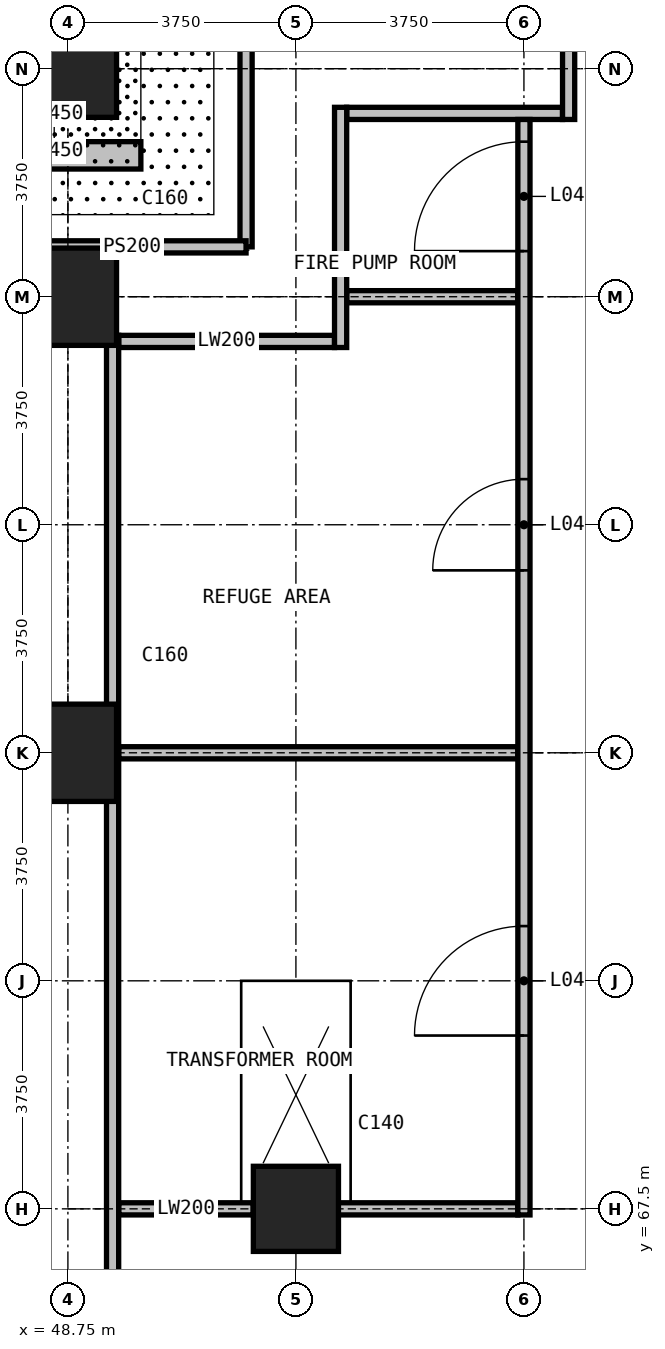
"""IFC4 building model, lengths in metres.
Left out: names, types, materials, properties, quantities, classifications, styles, units other than length and angle.
Written with IfcOpenShell. Run it as: python <this file> out.ifc"""

import sys

from ifc_helpers import new_model, si_unit, direction, frame, frame_2d, origin, origin_2d, place, context, subcontext, project, spatial, rectangle, extrude, element, fill, save


model = new_model("IFC4")
c1 = context("Model", 3, precision=1e-05, world=origin(), true_north=direction((0.0, 1.0)))
c2 = subcontext(c1, "Body", "Model", "MODEL_VIEW")
j1 = project(units=[si_unit("LENGTHUNIT", "METRE"), si_unit("PLANEANGLEUNIT", "RADIAN")], contexts=[c1])
p1 = place(None, origin())
s1 = spatial("IfcSite", under=j1, at=p1, CompositionType="ELEMENT")
p2 = place(p1, origin())
s2 = spatial("IfcBuilding", under=s1, at=p2, CompositionType="ELEMENT")
p3 = place(p2, frame((0.0, 0.0, 30.0)))
s3 = spatial("IfcBuildingStorey", under=s2, at=p3, CompositionType="ELEMENT", Elevation=30.0)
for number, where, z_axis, x_axis in (
    (1, (48.75, 75.0, 0.0), (0.0, 0.0, 1.0), (1.0, 0.0, 0.0)),
    (2, (48.75, 82.5, 0.0), (0.0, 0.0, 1.0), (1.0, 0.0, 0.0)),
):
    element("IfcColumn", number, at=place(p3, frame(where, z_axis=z_axis, x_axis=x_axis)), inside=s3, PredefinedType="COLUMN", context=c2, shape_type="SweptSolid", body=[
        extrude(rectangle(XDim=1.6, YDim=1.6, at=origin_2d()), origin(), (0.0, 0.0, 1.0), 5.0),
    ])
p4 = place(p3, frame((52.5, 67.5, 0.0), z_axis=(0.0, 0.0, 1.0), x_axis=(1.0, 0.0, 0.0)))
e3 = element("IfcColumn", 3, at=p4, inside=s3, PredefinedType="COLUMN", context=c2, shape_type="SweptSolid", body=[
    extrude(rectangle(XDim=1.4, YDim=1.4, at=origin_2d()), origin(), (0.0, 0.0, 1.0), 5.0),
])
p5 = place(p3, frame((48.75, 86.25, 0.0), z_axis=(0.0, 0.0, 1.0), x_axis=(1.0, 0.0, 0.0)))
e4 = element("IfcColumn", 4, at=p5, inside=s3, PredefinedType="COLUMN", context=c2, shape_type="SweptSolid", body=[
    extrude(rectangle(XDim=1.6, YDim=1.6, at=origin_2d()), origin(), (0.0, 0.0, 1.0), 5.0),
])
for number, where, z_axis, x_axis in (
    (5, (51.68, 83.32, 0.0), (0.0, 0.0, 1.0), (0.0, 1.0, 0.0)),
    (6, (47.93, 83.32, 0.0), (0.0, 0.0, 1.0), (1.0, 0.0, 0.0)),
):
    element("IfcWall", number, at=place(p3, frame(where, z_axis=z_axis, x_axis=x_axis)), inside=s3, PredefinedType="SOLIDWALL", context=c2, shape_type="SweptSolid", body=[
        extrude(rectangle(XDim=3.75, YDim=0.2, at=frame_2d((1.875, 0.0))), origin(), (0.0, 0.0, 1.0), 4.7),
    ])
p6 = place(p3, frame((47.1, 84.825, 0.0), z_axis=(0.0, 0.0, 1.0), x_axis=(1.0, 0.0, 0.0)))
e7 = element("IfcWall", 7, at=p6, inside=s3, PredefinedType="USERDEFINED", context=c2, shape_type="SweptSolid", body=[
    extrude(rectangle(XDim=2.85, YDim=0.45, at=frame_2d((1.425, 0.0))), origin(), (0.0, 0.0, 1.0), 5.2),
])
p7 = place(p3, frame((49.585, 67.5, 0.0), z_axis=(0.0, 0.0, 1.0), x_axis=(1.0, 0.0, 0.0)))
e8 = element("IfcWall", 8, at=p7, inside=s3, PredefinedType="PARTITIONING", context=c2, shape_type="SweptSolid", body=[
    extrude(rectangle(XDim=2.215, YDim=0.2, at=frame_2d((1.107, 0.0))), origin(), (0.0, 0.0, 1.0), 3.3),
])
p8 = place(p3, frame((51.8, 67.5, 0.0), z_axis=(0.0, 0.0, 1.0), x_axis=(1.0, 0.0, 0.0)))
e9 = element("IfcWall", 9, at=p8, inside=s3, PredefinedType="PARTITIONING", context=c2, shape_type="SweptSolid", body=[
    extrude(rectangle(XDim=1.349, YDim=0.2, at=frame_2d((0.674, 0.0))), origin(), (0.0, 0.0, 1.0), 4.7),
])
p9 = place(p3, frame((53.149, 67.5, 0.0), z_axis=(0.0, 0.0, 1.0), x_axis=(1.0, 0.0, 0.0)))
e10 = element("IfcWall", 10, at=p9, inside=s3, PredefinedType="PARTITIONING", context=c2, shape_type="SweptSolid", body=[
    extrude(rectangle(XDim=3.001, YDim=0.2, at=frame_2d((1.5, 0.0))), origin(), (0.0, 0.0, 1.0), 3.1),
])
p10 = place(p3, frame((49.585, 75.0, 0.0), z_axis=(0.0, 0.0, 1.0), x_axis=(1.0, 0.0, 0.0)))
e11 = element("IfcWall", 11, at=p10, inside=s3, PredefinedType="PARTITIONING", context=c2, shape_type="SweptSolid", body=[
    extrude(rectangle(XDim=6.565, YDim=0.2, at=frame_2d((3.282, 0.0))), origin(), (0.0, 0.0, 1.0), 2.1),
])
p11 = place(p3, frame((49.585, 81.765, 0.0), z_axis=(0.0, 0.0, 1.0), x_axis=(1.0, 0.0, 0.0)))
e12 = element("IfcWall", 12, at=p11, inside=s3, PredefinedType="PARTITIONING", context=c2, shape_type="SweptSolid", body=[
    extrude(rectangle(XDim=3.55, YDim=0.2, at=frame_2d((1.775, 0.0))), origin(), (0.0, 0.0, 1.0), 4.7),
])
p12 = place(p3, frame((53.335, 82.5, 0.0), z_axis=(0.0, 0.0, 1.0), x_axis=(1.0, 0.0, 0.0)))
e13 = element("IfcWall", 13, at=p12, inside=s3, PredefinedType="PARTITIONING", context=c2, shape_type="SweptSolid", body=[
    extrude(rectangle(XDim=2.815, YDim=0.2, at=frame_2d((1.407, 0.0))), origin(), (0.0, 0.0, 1.0), 2.1),
])
p13 = place(p3, frame((53.335, 85.515, 0.0), z_axis=(0.0, 0.0, 1.0), x_axis=(1.0, 0.0, 0.0)))
e14 = element("IfcWall", 14, at=p13, inside=s3, PredefinedType="PARTITIONING", context=c2, shape_type="SweptSolid", body=[
    extrude(rectangle(XDim=3.55, YDim=0.2, at=frame_2d((1.775, 0.0))), origin(), (0.0, 0.0, 1.0), 4.7),
])
p14 = place(p3, frame((49.485, 53.135, 0.0), z_axis=(0.0, 0.0, 1.0), x_axis=(0.0, 1.0, 0.0)))
e15 = element("IfcWall", 15, at=p14, inside=s3, PredefinedType="PARTITIONING", context=c2, shape_type="SweptSolid", body=[
    extrude(rectangle(XDim=28.73, YDim=0.2, at=frame_2d((14.365, 0.0))), origin(), (0.0, 0.0, 1.0), 4.7),
])
p15 = place(p3, frame((53.235, 81.665, 0.0), z_axis=(0.0, 0.0, 1.0), x_axis=(0.0, 1.0, 0.0)))
e16 = element("IfcWall", 16, at=p15, inside=s3, PredefinedType="PARTITIONING", context=c2, shape_type="SweptSolid", body=[
    extrude(rectangle(XDim=3.95, YDim=0.2, at=frame_2d((1.975, 0.0))), origin(), (0.0, 0.0, 1.0), 4.7),
])
p16 = place(p3, frame((56.25, 67.4, 0.0), z_axis=(0.0, 0.0, 1.0), x_axis=(0.0, 1.0, 0.0)))
e17 = element("IfcWall", 17, at=p16, inside=s3, PredefinedType="PARTITIONING", context=c2, shape_type="SweptSolid", body=[
    extrude(rectangle(XDim=18.015, YDim=0.2, at=frame_2d((9.008, 0.0))), origin(), (0.0, 0.0, 1.0), 4.7),
])
p17 = place(p16, frame((10.6, 0.0, 0.0)))
e18 = element("IfcOpeningElement", 18, at=p17, cuts=e17, PredefinedType="OPENING", context=c2, shape_type="SweptSolid", body=[
    extrude(rectangle(XDim=1.5, YDim=2.2, at=frame_2d((0.75, 1.1))), frame((0.0, 0.11, 0.0), z_axis=(0.0, -1.0, 0.0), x_axis=(1.0, 0.0, 0.0)), (0.0, 0.0, 1.0), 0.22),
])
p18 = place(p16, frame((2.95, 0.0, 0.0)))
e19 = element("IfcOpeningElement", 19, at=p18, cuts=e17, PredefinedType="OPENING", context=c2, shape_type="SweptSolid", body=[
    extrude(rectangle(XDim=1.8, YDim=2.3, at=frame_2d((0.9, 1.15))), frame((0.0, 0.11, 0.0), z_axis=(0.0, -1.0, 0.0), x_axis=(1.0, 0.0, 0.0)), (0.0, 0.0, 1.0), 0.22),
])
p19 = place(p16, frame((15.85, 0.0, 0.0)))
e20 = element("IfcOpeningElement", 20, at=p19, cuts=e17, PredefinedType="OPENING", context=c2, shape_type="SweptSolid", body=[
    extrude(rectangle(XDim=1.8, YDim=2.3, at=frame_2d((0.9, 1.15))), frame((0.0, 0.11, 0.0), z_axis=(0.0, -1.0, 0.0), x_axis=(1.0, 0.0, 0.0)), (0.0, 0.0, 1.0), 0.22),
])
p20 = place(p3, frame((56.985, 85.415, 0.0), z_axis=(0.0, 0.0, 1.0), x_axis=(0.0, 1.0, 0.0)))
e21 = element("IfcWall", 21, at=p20, inside=s3, PredefinedType="PARTITIONING", context=c2, shape_type="SweptSolid", body=[
    extrude(rectangle(XDim=3.95, YDim=0.2, at=frame_2d((1.975, 0.0))), origin(), (0.0, 0.0, 1.0), 4.7),
])
p21 = place(p17, origin())
e22 = element("IfcDoor", 22, at=p21, inside=s3, OperationType="DOUBLE_DOOR_SINGLE_SWING", PredefinedType="DOOR", context=c2, shape_type="SweptSolid", body=[
    extrude(rectangle(XDim=1.5, YDim=2.2, at=frame_2d((0.75, 1.1))), frame((0.0, 0.025, 0.0), z_axis=(0.0, -1.0, 0.0), x_axis=(1.0, 0.0, 0.0)), (0.0, 0.0, 1.0), 0.05),
])
fill(e18, e22)
p22 = place(p18, origin())
e23 = element("IfcDoor", 23, at=p22, inside=s3, OperationType="DOUBLE_DOOR_SINGLE_SWING", PredefinedType="DOOR", context=c2, shape_type="SweptSolid", body=[
    extrude(rectangle(XDim=1.8, YDim=2.3, at=frame_2d((0.9, 1.15))), frame((0.0, 0.025, 0.0), z_axis=(0.0, -1.0, 0.0), x_axis=(1.0, 0.0, 0.0)), (0.0, 0.0, 1.0), 0.05),
])
fill(e19, e23)
p23 = place(p19, origin())
e24 = element("IfcDoor", 24, at=p23, inside=s3, OperationType="DOUBLE_DOOR_SINGLE_SWING", PredefinedType="DOOR", context=c2, shape_type="SweptSolid", body=[
    extrude(rectangle(XDim=1.8, YDim=2.3, at=frame_2d((0.9, 1.15))), frame((0.0, 0.025, 0.0), z_axis=(0.0, -1.0, 0.0), x_axis=(1.0, 0.0, 0.0)), (0.0, 0.0, 1.0), 0.05),
])
fill(e20, e24)
save(model, sys.argv[1])
